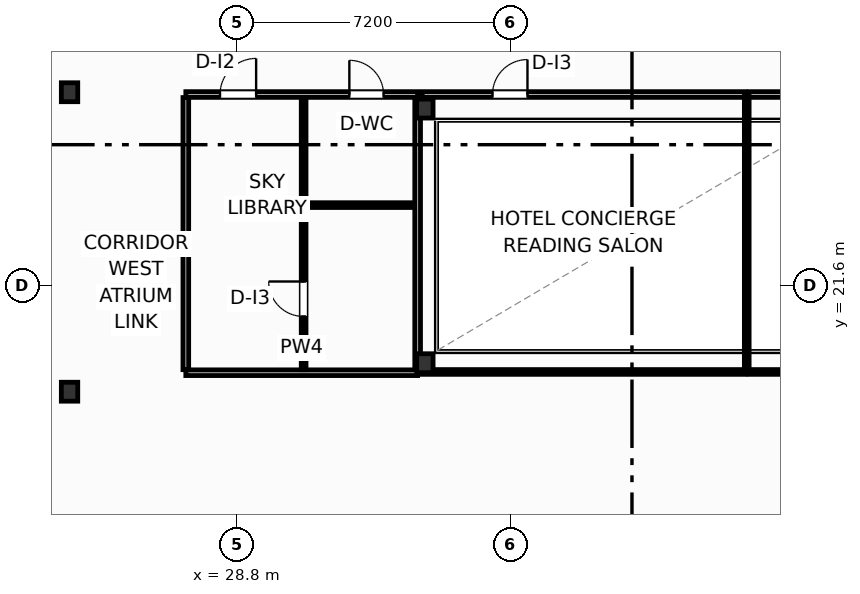
"""IFC4 building model, lengths in metres.
Left out: names, types, materials, properties, quantities, classifications, styles, units other than length and angle.
Written with IfcOpenShell. Run it as: python <this file> out.ifc"""

import sys

from ifc_helpers import new_model, si_unit, direction, frame, frame_2d, origin, origin_2d, place, context, subcontext, project, spatial, rectangle, i_section, extrude, element, fill, save


model = new_model("IFC4")
c1 = context("Model", 3, precision=1e-05, world=origin(), true_north=direction((0.0, 1.0)))
c2 = subcontext(c1, "Body", "Model", "MODEL_VIEW")
j1 = project(units=[si_unit("LENGTHUNIT", "METRE"), si_unit("PLANEANGLEUNIT", "RADIAN")], contexts=[c1])
p1 = place(None, origin())
s1 = spatial("IfcSite", under=j1, at=p1, CompositionType="ELEMENT")
p2 = place(p1, origin())
s2 = spatial("IfcBuilding", under=s1, at=p2, CompositionType="ELEMENT")
p3 = place(p2, frame((0.0, 0.0, 67.7)))
s3 = spatial("IfcBuildingStorey", under=s2, at=p3, CompositionType="ELEMENT", Elevation=67.7)
for number, where, z_axis, x_axis in (
    (1, (33.75, 19.55, 0.0), (0.0, 0.0, 1.0), (1.0, 0.0, 0.0)),
    (2, (33.75, 26.25, 0.0), (0.0, 0.0, 1.0), (1.0, 0.0, 0.0)),
    (3, (24.4, 18.8, 0.0), (0.0, 0.0, 1.0), (1.0, 0.0, 0.0)),
    (4, (24.4, 26.68, 0.0), (0.0, 0.0, 1.0), (1.0, 0.0, 0.0)),
):
    element("IfcColumn", number, at=place(p3, frame(where, z_axis=z_axis, x_axis=x_axis)), inside=s3, PredefinedType="COLUMN", context=c2, shape_type="SweptSolid", body=[
        extrude(i_section(OverallWidth=0.432, OverallDepth=0.498, WebThickness=0.056, FlangeThickness=0.089, FilletRadius=0.025, at=origin_2d()), origin(), (0.0, 0.0, 1.0), 3.7),
    ])
p4 = place(p3, frame((33.68, 26.62, 0.0), z_axis=(0.0, 0.0, 1.0), x_axis=(1.0, 0.0, 0.0)))
e5 = element("IfcWall", 5, at=p4, inside=s3, PredefinedType="PARTITIONING", context=c2, shape_type="SweptSolid", body=[
    extrude(rectangle(XDim=8.5, YDim=0.15, at=frame_2d((4.25, 0.0))), origin(), (0.0, 0.0, 1.0), 3.38),
])
p5 = place(p4, frame((1.85, 0.0, 0.0)))
e6 = element("IfcOpeningElement", 6, at=p5, cuts=e5, PredefinedType="OPENING", context=c2, shape_type="SweptSolid", body=[
    extrude(rectangle(XDim=0.92, YDim=2.05, at=frame_2d((0.46, 1.025))), frame((0.0, 0.085, 0.0), z_axis=(0.0, -1.0, 0.0), x_axis=(1.0, 0.0, 0.0)), (0.0, 0.0, 1.0), 0.17),
])
p6 = place(p3, frame((33.68, 19.32, 0.0), z_axis=(0.0, 0.0, 1.0), x_axis=(1.0, 0.0, 0.0)))
e7 = element("IfcWall", 7, at=p6, inside=s3, PredefinedType="PARTITIONING", context=c2, shape_type="SweptSolid", body=[
    extrude(rectangle(XDim=8.5, YDim=0.125, at=frame_2d((4.25, 0.0))), origin(), (0.0, 0.0, 1.0), 2.754),
])
p7 = place(p3, frame((42.22, 19.32, 0.0), z_axis=(0.0, 0.0, 1.0), x_axis=(0.0, 1.0, 0.0)))
e8 = element("IfcWall", 8, at=p7, inside=s3, PredefinedType="PARTITIONING", context=c2, shape_type="SweptSolid", body=[
    extrude(rectangle(XDim=7.3, YDim=0.125, at=frame_2d((3.65, 0.0))), origin(), (0.0, 0.0, 1.0), 3.38),
])
p8 = place(p3, frame((42.28, 26.62, 0.0), z_axis=(0.0, 0.0, 1.0), x_axis=(1.0, 0.0, 0.0)))
e9 = element("IfcWall", 9, at=p8, inside=s3, PredefinedType="PARTITIONING", context=c2, shape_type="SweptSolid", body=[
    extrude(rectangle(XDim=8.06, YDim=0.15, at=frame_2d((4.03, 0.0))), origin(), (0.0, 0.0, 1.0), 3.38),
])
p9 = place(p8, frame((0.954, 0.0, 0.0)))
e10 = element("IfcOpeningElement", 10, at=p9, cuts=e9, PredefinedType="OPENING", context=c2, shape_type="SweptSolid", body=[
    extrude(rectangle(XDim=0.92, YDim=2.05, at=frame_2d((0.46, 1.025))), frame((0.0, 0.085, 0.0), z_axis=(0.0, -1.0, 0.0), x_axis=(1.0, 0.0, 0.0)), (0.0, 0.0, 1.0), 0.17),
])
p10 = place(p3, frame((42.28, 19.32, 0.0), z_axis=(0.0, 0.0, 1.0), x_axis=(1.0, 0.0, 0.0)))
e11 = element("IfcWall", 11, at=p10, inside=s3, PredefinedType="PARTITIONING", context=c2, shape_type="SweptSolid", body=[
    extrude(rectangle(XDim=8.06, YDim=0.125, at=frame_2d((4.03, 0.0))), origin(), (0.0, 0.0, 1.0), 2.592),
])
p11 = place(p3, frame((27.46, 26.62, 0.0), z_axis=(0.0, 0.0, 1.0), x_axis=(1.0, 0.0, 0.0)))
e12 = element("IfcWall", 12, at=p11, inside=s3, PredefinedType="PARTITIONING", context=c2, shape_type="SweptSolid", body=[
    extrude(rectangle(XDim=6.1, YDim=0.15, at=frame_2d((3.05, 0.0))), origin(), (0.0, 0.0, 1.0), 2.592),
])
p12 = place(p11, frame((0.9, 0.0, 0.0)))
e13 = element("IfcOpeningElement", 13, at=p12, cuts=e12, PredefinedType="OPENING", context=c2, shape_type="SweptSolid", body=[
    extrude(rectangle(XDim=0.95, YDim=2.05, at=frame_2d((0.475, 1.025))), frame((0.0, 0.085, 0.0), z_axis=(0.0, -1.0, 0.0), x_axis=(1.0, 0.0, 0.0)), (0.0, 0.0, 1.0), 0.17),
])
p13 = place(p11, frame((4.303, 0.0, 0.0)))
e14 = element("IfcOpeningElement", 14, at=p13, cuts=e12, PredefinedType="OPENING", context=c2, shape_type="SweptSolid", body=[
    extrude(rectangle(XDim=0.9, YDim=2.05, at=frame_2d((0.45, 1.025))), frame((0.0, 0.085, 0.0), z_axis=(0.0, -1.0, 0.0), x_axis=(1.0, 0.0, 0.0)), (0.0, 0.0, 1.0), 0.17),
])
p14 = place(p3, frame((27.46, 19.3, 0.0), z_axis=(0.0, 0.0, 1.0), x_axis=(1.0, 0.0, 0.0)))
e15 = element("IfcWall", 15, at=p14, inside=s3, PredefinedType="PARTITIONING", context=c2, shape_type="SweptSolid", body=[
    extrude(rectangle(XDim=6.1, YDim=0.15, at=frame_2d((3.05, 0.0))), origin(), (0.0, 0.0, 1.0), 2.592),
])
p15 = place(p3, frame((30.56, 19.38, 0.0), z_axis=(0.0, 0.0, 1.0), x_axis=(0.0, 1.0, 0.0)))
e16 = element("IfcWall", 16, at=p15, inside=s3, PredefinedType="PARTITIONING", context=c2, shape_type="SweptSolid", body=[
    extrude(rectangle(XDim=7.16, YDim=0.125, at=frame_2d((3.58, 0.0))), origin(), (0.0, 0.0, 1.0), 3.38),
])
p16 = place(p15, frame((1.4, 0.0, 0.0)))
e17 = element("IfcOpeningElement", 17, at=p16, cuts=e16, PredefinedType="OPENING", context=c2, shape_type="SweptSolid", body=[
    extrude(rectangle(XDim=0.92, YDim=2.05, at=frame_2d((0.46, 1.025))), frame((0.0, 0.073, 0.0), z_axis=(0.0, -1.0, 0.0), x_axis=(1.0, 0.0, 0.0)), (0.0, 0.0, 1.0), 0.145),
])
p17 = place(p3, frame((30.64, 23.71, 0.0), z_axis=(0.0, 0.0, 1.0), x_axis=(1.0, 0.0, 0.0)))
e18 = element("IfcWall", 18, at=p17, inside=s3, PredefinedType="PARTITIONING", context=c2, shape_type="SweptSolid", body=[
    extrude(rectangle(XDim=2.88, YDim=0.125, at=frame_2d((1.44, 0.0))), origin(), (0.0, 0.0, 1.0), 3.38),
])
p18 = place(p3, frame((27.46, 19.38, 0.0), z_axis=(0.0, 0.0, 1.0), x_axis=(0.0, 1.0, 0.0)))
e19 = element("IfcWall", 19, at=p18, inside=s3, PredefinedType="PARTITIONING", context=c2, shape_type="SweptSolid", body=[
    extrude(rectangle(XDim=7.16, YDim=0.15, at=frame_2d((3.58, 0.0))), origin(), (0.0, 0.0, 1.0), 3.38),
])
p19 = place(p3, frame((33.56, 19.38, 0.0), z_axis=(0.0, 0.0, 1.0), x_axis=(0.0, 1.0, 0.0)))
e20 = element("IfcWall", 20, at=p19, inside=s3, PredefinedType="PARTITIONING", context=c2, shape_type="SweptSolid", body=[
    extrude(rectangle(XDim=7.16, YDim=0.15, at=frame_2d((3.58, 0.0))), origin(), (0.0, 0.0, 1.0), 1.165),
])
p20 = place(p5, origin())
e21 = element("IfcDoor", 21, at=p20, inside=s3, OperationType="SINGLE_SWING_RIGHT", PredefinedType="DOOR", context=c2, shape_type="SweptSolid", body=[
    extrude(rectangle(XDim=0.92, YDim=2.05, at=frame_2d((0.46, 1.025))), frame((0.0, 0.025, 0.0), z_axis=(0.0, -1.0, 0.0), x_axis=(1.0, 0.0, 0.0)), (0.0, 0.0, 1.0), 0.05),
])
fill(e6, e21)
p21 = place(p12, origin())
e22 = element("IfcDoor", 22, at=p21, inside=s3, OperationType="SINGLE_SWING_RIGHT", PredefinedType="DOOR", context=c2, shape_type="SweptSolid", body=[
    extrude(rectangle(XDim=0.95, YDim=2.05, at=frame_2d((0.475, 1.025))), frame((0.0, 0.025, 0.0), z_axis=(0.0, -1.0, 0.0), x_axis=(1.0, 0.0, 0.0)), (0.0, 0.0, 1.0), 0.05),
])
fill(e13, e22)
p22 = place(p13, origin())
e23 = element("IfcDoor", 23, at=p22, inside=s3, OperationType="SINGLE_SWING_LEFT", PredefinedType="DOOR", context=c2, shape_type="SweptSolid", body=[
    extrude(rectangle(XDim=0.9, YDim=2.05, at=frame_2d((0.45, 1.025))), frame((0.0, 0.025, 0.0), z_axis=(0.0, -1.0, 0.0), x_axis=(1.0, 0.0, 0.0)), (0.0, 0.0, 1.0), 0.05),
])
fill(e14, e23)
p23 = place(p16, origin())
e24 = element("IfcDoor", 24, at=p23, inside=s3, OperationType="SINGLE_SWING_RIGHT", PredefinedType="DOOR", context=c2, shape_type="SweptSolid", body=[
    extrude(rectangle(XDim=0.92, YDim=2.05, at=frame_2d((0.46, 1.025))), frame((0.0, 0.025, 0.0), z_axis=(0.0, -1.0, 0.0), x_axis=(1.0, 0.0, 0.0)), (0.0, 0.0, 1.0), 0.05),
])
fill(e17, e24)
save(model, sys.argv[1])
